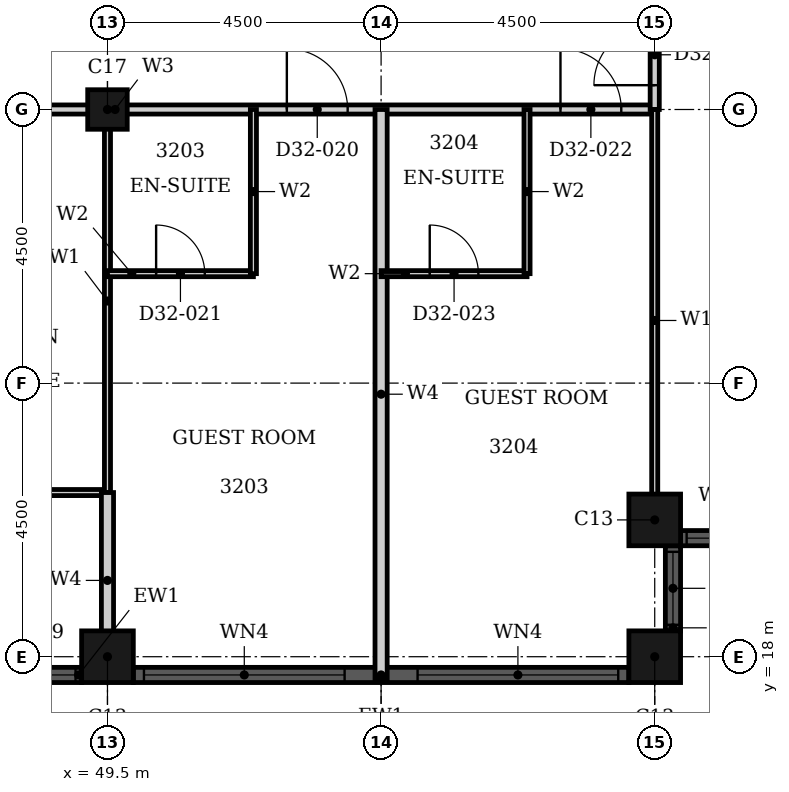
"""IFC4 building model, lengths in metres.
Left out: names, types, materials, properties, quantities, classifications, styles, units other than length and angle.
Written with IfcOpenShell. Run it as: python <this file> out.ifc"""

import sys

from ifc_helpers import new_model, si_unit, direction, frame, frame_2d, origin, origin_2d, place, context, subcontext, project, spatial, rectangle, hollow_rectangle, extrude, element, fill, save


model = new_model("IFC4")
c1 = context("Model", 3, precision=1e-05, world=origin(), true_north=direction((0.0, 1.0)))
c2 = subcontext(c1, "Body", "Model", "MODEL_VIEW")
j1 = project(units=[si_unit("LENGTHUNIT", "METRE"), si_unit("PLANEANGLEUNIT", "RADIAN")], contexts=[c1])
p1 = place(None, origin())
s1 = spatial("IfcSite", under=j1, at=p1, CompositionType="ELEMENT")
p2 = place(p1, origin())
s2 = spatial("IfcBuilding", under=s1, at=p2, CompositionType="ELEMENT")
p3 = place(p2, frame((0.0, 0.0, 129.6)))
s3 = spatial("IfcBuildingStorey", under=s2, at=p3, CompositionType="ELEMENT", Elevation=129.6)
for number, where, z_axis, x_axis in (
    (1, (49.5, 18.0, 0.0), (0.0, 0.0, 1.0), (1.0, 0.0, 0.0)),
    (2, (58.5, 18.0, 0.0), (0.0, 0.0, 1.0), (1.0, 0.0, 0.0)),
    (3, (58.5, 20.25, 0.0), (0.0, 0.0, 1.0), (1.0, 0.0, 0.0)),
):
    element("IfcColumn", number, at=place(p3, frame(where, z_axis=z_axis, x_axis=x_axis)), inside=s3, PredefinedType="COLUMN", context=c2, shape_type="SweptSolid", body=[
        extrude(hollow_rectangle(XDim=0.85, YDim=0.85, WallThickness=0.026, at=origin_2d()), origin(), (0.0, 0.0, 1.0), 3.6),
    ])
p4 = place(p3, frame((49.5, 27.0, 0.0), z_axis=(0.0, 0.0, 1.0), x_axis=(1.0, 0.0, 0.0)))
e4 = element("IfcColumn", 4, at=p4, inside=s3, PredefinedType="COLUMN", context=c2, shape_type="SweptSolid", body=[
    extrude(hollow_rectangle(XDim=0.65, YDim=0.65, WallThickness=0.021, at=origin_2d()), origin(), (0.0, 0.0, 1.0), 3.6),
])
p5 = place(p3, frame((47.675, 17.7, 0.0), z_axis=(0.0, 0.0, 1.0), x_axis=(1.0, 0.0, 0.0)))
e5 = element("IfcWall", 5, at=p5, inside=s3, PredefinedType="SOLIDWALL", context=c2, shape_type="SweptSolid", body=[
    extrude(rectangle(XDim=1.4, YDim=0.25, at=frame_2d((0.7, 0.0))), origin(), (0.0, 0.0, 1.0), 3.6),
])
p6 = place(p5, frame((0.1, 0.0, 0.9)))
e6 = element("IfcOpeningElement", 6, at=p6, cuts=e5, PredefinedType="OPENING", context=c2, shape_type="SweptSolid", body=[
    extrude(rectangle(XDim=1.2, YDim=2.08, at=frame_2d((0.6, 1.04))), frame((0.0, 0.135, 0.0), z_axis=(0.0, -1.0, 0.0), x_axis=(1.0, 0.0, 0.0)), (0.0, 0.0, 1.0), 0.27),
])
p7 = place(p3, frame((49.925, 17.7, 0.0), z_axis=(0.0, 0.0, 1.0), x_axis=(1.0, 0.0, 0.0)))
e7 = element("IfcWall", 7, at=p7, inside=s3, PredefinedType="SOLIDWALL", context=c2, shape_type="SweptSolid", body=[
    extrude(rectangle(XDim=8.15, YDim=0.25, at=frame_2d((4.075, 0.0))), origin(), (0.0, 0.0, 1.0), 3.6),
])
p8 = place(p7, frame((0.175, 0.0, 0.9)))
e8 = element("IfcOpeningElement", 8, at=p8, cuts=e7, PredefinedType="OPENING", context=c2, shape_type="SweptSolid", body=[
    extrude(rectangle(XDim=3.3, YDim=2.08, at=frame_2d((1.65, 1.04))), frame((0.0, 0.135, 0.0), z_axis=(0.0, -1.0, 0.0), x_axis=(1.0, 0.0, 0.0)), (0.0, 0.0, 1.0), 0.27),
])
p9 = place(p7, frame((4.675, 0.0, 0.9)))
e9 = element("IfcOpeningElement", 9, at=p9, cuts=e7, PredefinedType="OPENING", context=c2, shape_type="SweptSolid", body=[
    extrude(rectangle(XDim=3.3, YDim=2.08, at=frame_2d((1.65, 1.04))), frame((0.0, 0.135, 0.0), z_axis=(0.0, -1.0, 0.0), x_axis=(1.0, 0.0, 0.0)), (0.0, 0.0, 1.0), 0.27),
])
p10 = place(p3, frame((58.8, 18.425, 0.0), z_axis=(0.0, 0.0, 1.0), x_axis=(0.0, 1.0, 0.0)))
e10 = element("IfcWall", 10, at=p10, inside=s3, PredefinedType="SOLIDWALL", context=c2, shape_type="SweptSolid", body=[
    extrude(rectangle(XDim=1.4, YDim=0.25, at=frame_2d((0.7, 0.0))), origin(), (0.0, 0.0, 1.0), 3.6),
])
p11 = place(p10, frame((0.1, 0.0, 0.9)))
e11 = element("IfcOpeningElement", 11, at=p11, cuts=e10, PredefinedType="OPENING", context=c2, shape_type="SweptSolid", body=[
    extrude(rectangle(XDim=1.2, YDim=2.08, at=frame_2d((0.6, 1.04))), frame((0.0, 0.135, 0.0), z_axis=(0.0, -1.0, 0.0), x_axis=(1.0, 0.0, 0.0)), (0.0, 0.0, 1.0), 0.27),
])
p12 = place(p3, frame((58.925, 19.95, 0.0), z_axis=(0.0, 0.0, 1.0), x_axis=(1.0, 0.0, 0.0)))
e12 = element("IfcWall", 12, at=p12, inside=s3, PredefinedType="SOLIDWALL", context=c2, shape_type="SweptSolid", body=[
    extrude(rectangle(XDim=1.4, YDim=0.25, at=frame_2d((0.7, 0.0))), origin(), (0.0, 0.0, 1.0), 3.6),
])
p13 = place(p12, frame((0.1, 0.0, 0.9)))
e13 = element("IfcOpeningElement", 13, at=p13, cuts=e12, PredefinedType="OPENING", context=c2, shape_type="SweptSolid", body=[
    extrude(rectangle(XDim=1.2, YDim=2.08, at=frame_2d((0.6, 1.04))), frame((0.0, 0.135, 0.0), z_axis=(0.0, -1.0, 0.0), x_axis=(1.0, 0.0, 0.0)), (0.0, 0.0, 1.0), 0.27),
])
p14 = place(p3, frame((46.8, 27.0, 0.0), z_axis=(0.0, 0.0, 1.0), x_axis=(1.0, 0.0, 0.0)))
e14 = element("IfcWall", 14, at=p14, inside=s3, PredefinedType="PARTITIONING", context=c2, shape_type="SweptSolid", body=[
    extrude(rectangle(XDim=11.7, YDim=0.15, at=frame_2d((5.85, 0.0))), origin(), (0.0, 0.0, 1.0), 2.58),
])
p15 = place(p14, frame((5.65, 0.0, 0.0)))
e15 = element("IfcOpeningElement", 15, at=p15, cuts=e14, PredefinedType="OPENING", context=c2, shape_type="SweptSolid", body=[
    extrude(rectangle(XDim=1.0, YDim=2.1, at=frame_2d((0.5, 1.05))), frame((0.0, 0.085, 0.0), z_axis=(0.0, -1.0, 0.0), x_axis=(1.0, 0.0, 0.0)), (0.0, 0.0, 1.0), 0.17),
])
p16 = place(p14, frame((10.15, 0.0, 0.0)))
e16 = element("IfcOpeningElement", 16, at=p16, cuts=e14, PredefinedType="OPENING", context=c2, shape_type="SweptSolid", body=[
    extrude(rectangle(XDim=1.0, YDim=2.1, at=frame_2d((0.5, 1.05))), frame((0.0, 0.085, 0.0), z_axis=(0.0, -1.0, 0.0), x_axis=(1.0, 0.0, 0.0)), (0.0, 0.0, 1.0), 0.17),
])
p17 = place(p3, frame((58.5, 27.0, 0.0), z_axis=(0.0, 0.0, 1.0), x_axis=(0.0, 1.0, 0.0)))
e17 = element("IfcWall", 17, at=p17, inside=s3, PredefinedType="PARTITIONING", context=c2, shape_type="SweptSolid", body=[
    extrude(rectangle(XDim=1.8, YDim=0.15, at=frame_2d((0.9, 0.0))), origin(), (0.0, 0.0, 1.0), 3.3),
])
p18 = place(p17, frame((0.4, 0.0, 0.0)))
e18 = element("IfcOpeningElement", 18, at=p18, cuts=e17, PredefinedType="OPENING", context=c2, shape_type="SweptSolid", body=[
    extrude(rectangle(XDim=1.0, YDim=2.1, at=frame_2d((0.5, 1.05))), frame((0.0, 0.085, 0.0), z_axis=(0.0, -1.0, 0.0), x_axis=(1.0, 0.0, 0.0)), (0.0, 0.0, 1.0), 0.17),
])
p19 = place(p3, frame((46.8, 20.7, 0.0), z_axis=(0.0, 0.0, 1.0), x_axis=(1.0, 0.0, 0.0)))
e19 = element("IfcWall", 19, at=p19, inside=s3, PredefinedType="PARTITIONING", context=c2, shape_type="SweptSolid", body=[
    extrude(rectangle(XDim=2.7, YDim=0.1, at=frame_2d((1.35, 0.0))), origin(), (0.0, 0.0, 1.0), 3.3),
])
p20 = place(p3, frame((49.5, 20.7, 0.0), z_axis=(0.0, 0.0, 1.0), x_axis=(0.0, 1.0, 0.0)))
e20 = element("IfcWall", 20, at=p20, inside=s3, PredefinedType="PARTITIONING", context=c2, shape_type="SweptSolid", body=[
    extrude(rectangle(XDim=6.3, YDim=0.1, at=frame_2d((3.15, 0.0))), origin(), (0.0, 0.0, 1.0), 2.38),
])
p21 = place(p3, frame((58.5, 20.06, 0.0), z_axis=(0.0, 0.0, 1.0), x_axis=(0.0, 1.0, 0.0)))
e21 = element("IfcWall", 21, at=p21, inside=s3, PredefinedType="PARTITIONING", context=c2, shape_type="SweptSolid", body=[
    extrude(rectangle(XDim=6.94, YDim=0.1, at=frame_2d((3.47, 0.0))), origin(), (0.0, 0.0, 1.0), 3.3),
])
p22 = place(p3, frame((49.5, 17.81, 0.0), z_axis=(0.0, 0.0, 1.0), x_axis=(0.0, 1.0, 0.0)))
e22 = element("IfcWall", 22, at=p22, inside=s3, PredefinedType="PARTITIONING", context=c2, shape_type="SweptSolid", body=[
    extrude(rectangle(XDim=2.89, YDim=0.2, at=frame_2d((1.445, 0.0))), origin(), (0.0, 0.0, 1.0), 2.38),
])
p23 = place(p3, frame((54.0, 17.635, 0.0), z_axis=(0.0, 0.0, 1.0), x_axis=(0.0, 1.0, 0.0)))
e23 = element("IfcWall", 23, at=p23, inside=s3, PredefinedType="PARTITIONING", context=c2, shape_type="SweptSolid", body=[
    extrude(rectangle(XDim=9.365, YDim=0.2, at=frame_2d((4.683, 0.0))), origin(), (0.0, 0.0, 1.0), 3.3),
])
p24 = place(p3, frame((49.5, 24.3, 0.0), z_axis=(0.0, 0.0, 1.0), x_axis=(1.0, 0.0, 0.0)))
e24 = element("IfcWall", 24, at=p24, inside=s3, PredefinedType="PARTITIONING", context=c2, shape_type="SweptSolid", body=[
    extrude(rectangle(XDim=2.4, YDim=0.1, at=frame_2d((1.2, 0.0))), origin(), (0.0, 0.0, 1.0), 3.3),
])
p25 = place(p24, frame((0.8, 0.0, 0.0)))
e25 = element("IfcOpeningElement", 25, at=p25, cuts=e24, PredefinedType="OPENING", context=c2, shape_type="SweptSolid", body=[
    extrude(rectangle(XDim=0.8, YDim=2.1, at=frame_2d((0.4, 1.05))), frame((0.0, 0.06, 0.0), z_axis=(0.0, -1.0, 0.0), x_axis=(1.0, 0.0, 0.0)), (0.0, 0.0, 1.0), 0.12),
])
p26 = place(p3, frame((54.0, 24.3, 0.0), z_axis=(0.0, 0.0, 1.0), x_axis=(1.0, 0.0, 0.0)))
e26 = element("IfcWall", 26, at=p26, inside=s3, PredefinedType="PARTITIONING", context=c2, shape_type="SweptSolid", body=[
    extrude(rectangle(XDim=2.4, YDim=0.1, at=frame_2d((1.2, 0.0))), origin(), (0.0, 0.0, 1.0), 3.3),
])
p27 = place(p26, frame((0.8, 0.0, 0.0)))
e27 = element("IfcOpeningElement", 27, at=p27, cuts=e26, PredefinedType="OPENING", context=c2, shape_type="SweptSolid", body=[
    extrude(rectangle(XDim=0.8, YDim=2.1, at=frame_2d((0.4, 1.05))), frame((0.0, 0.06, 0.0), z_axis=(0.0, -1.0, 0.0), x_axis=(1.0, 0.0, 0.0)), (0.0, 0.0, 1.0), 0.12),
])
for number, where, z_axis, x_axis in (
    (28, (51.9, 24.3, 0.0), (0.0, 0.0, 1.0), (0.0, 1.0, 0.0)),
    (29, (56.4, 24.3, 0.0), (0.0, 0.0, 1.0), (0.0, 1.0, 0.0)),
):
    element("IfcWall", number, at=place(p3, frame(where, z_axis=z_axis, x_axis=x_axis)), inside=s3, PredefinedType="PARTITIONING", context=c2, shape_type="SweptSolid", body=[
        extrude(rectangle(XDim=2.7, YDim=0.1, at=frame_2d((1.35, 0.0))), origin(), (0.0, 0.0, 1.0), 3.3),
    ])
p28 = place(p6, origin())
e30 = element("IfcWindow", 30, at=p28, inside=s3, PartitioningType="SINGLE_PANEL", PredefinedType="WINDOW", context=c2, shape_type="SweptSolid", body=[
    extrude(rectangle(XDim=1.2, YDim=2.08, at=frame_2d((0.6, 1.04))), frame((0.0, 0.03, 0.0), z_axis=(0.0, -1.0, 0.0), x_axis=(1.0, 0.0, 0.0)), (0.0, 0.0, 1.0), 0.06),
])
fill(e6, e30)
p29 = place(p8, origin())
e31 = element("IfcWindow", 31, at=p29, inside=s3, PartitioningType="SINGLE_PANEL", PredefinedType="WINDOW", context=c2, shape_type="SweptSolid", body=[
    extrude(rectangle(XDim=3.3, YDim=2.08, at=frame_2d((1.65, 1.04))), frame((0.0, 0.03, 0.0), z_axis=(0.0, -1.0, 0.0), x_axis=(1.0, 0.0, 0.0)), (0.0, 0.0, 1.0), 0.06),
])
fill(e8, e31)
p30 = place(p9, origin())
e32 = element("IfcWindow", 32, at=p30, inside=s3, PartitioningType="SINGLE_PANEL", PredefinedType="WINDOW", context=c2, shape_type="SweptSolid", body=[
    extrude(rectangle(XDim=3.3, YDim=2.08, at=frame_2d((1.65, 1.04))), frame((0.0, 0.03, 0.0), z_axis=(0.0, -1.0, 0.0), x_axis=(1.0, 0.0, 0.0)), (0.0, 0.0, 1.0), 0.06),
])
fill(e9, e32)
p31 = place(p11, origin())
e33 = element("IfcWindow", 33, at=p31, inside=s3, PartitioningType="SINGLE_PANEL", PredefinedType="WINDOW", context=c2, shape_type="SweptSolid", body=[
    extrude(rectangle(XDim=1.2, YDim=2.08, at=frame_2d((0.6, 1.04))), frame((0.0, 0.03, 0.0), z_axis=(0.0, -1.0, 0.0), x_axis=(1.0, 0.0, 0.0)), (0.0, 0.0, 1.0), 0.06),
])
fill(e11, e33)
p32 = place(p13, origin())
e34 = element("IfcWindow", 34, at=p32, inside=s3, PartitioningType="SINGLE_PANEL", PredefinedType="WINDOW", context=c2, shape_type="SweptSolid", body=[
    extrude(rectangle(XDim=1.2, YDim=2.08, at=frame_2d((0.6, 1.04))), frame((0.0, 0.03, 0.0), z_axis=(0.0, -1.0, 0.0), x_axis=(1.0, 0.0, 0.0)), (0.0, 0.0, 1.0), 0.06),
])
fill(e13, e34)
p33 = place(p15, origin())
e35 = element("IfcDoor", 35, at=p33, inside=s3, OperationType="SINGLE_SWING_RIGHT", PredefinedType="DOOR", context=c2, shape_type="SweptSolid", body=[
    extrude(rectangle(XDim=1.0, YDim=2.1, at=frame_2d((0.5, 1.05))), frame((0.0, 0.025, 0.0), z_axis=(0.0, -1.0, 0.0), x_axis=(1.0, 0.0, 0.0)), (0.0, 0.0, 1.0), 0.05),
])
fill(e15, e35)
p34 = place(p25, origin())
e36 = element("IfcDoor", 36, at=p34, inside=s3, OperationType="SINGLE_SWING_LEFT", PredefinedType="DOOR", context=c2, shape_type="SweptSolid", body=[
    extrude(rectangle(XDim=0.8, YDim=2.1, at=frame_2d((0.4, 1.05))), frame((0.0, 0.025, 0.0), z_axis=(0.0, -1.0, 0.0), x_axis=(1.0, 0.0, 0.0)), (0.0, 0.0, 1.0), 0.05),
])
fill(e25, e36)
p35 = place(p16, origin())
e37 = element("IfcDoor", 37, at=p35, inside=s3, OperationType="SINGLE_SWING_RIGHT", PredefinedType="DOOR", context=c2, shape_type="SweptSolid", body=[
    extrude(rectangle(XDim=1.0, YDim=2.1, at=frame_2d((0.5, 1.05))), frame((0.0, 0.025, 0.0), z_axis=(0.0, -1.0, 0.0), x_axis=(1.0, 0.0, 0.0)), (0.0, 0.0, 1.0), 0.05),
])
fill(e16, e37)
p36 = place(p27, origin())
e38 = element("IfcDoor", 38, at=p36, inside=s3, OperationType="SINGLE_SWING_RIGHT", PredefinedType="DOOR", context=c2, shape_type="SweptSolid", body=[
    extrude(rectangle(XDim=0.8, YDim=2.1, at=frame_2d((0.4, 1.05))), frame((0.0, 0.025, 0.0), z_axis=(0.0, -1.0, 0.0), x_axis=(1.0, 0.0, 0.0)), (0.0, 0.0, 1.0), 0.05),
])
fill(e27, e38)
p37 = place(p18, origin())
e39 = element("IfcDoor", 39, at=p37, inside=s3, OperationType="SINGLE_SWING_LEFT", PredefinedType="DOOR", context=c2, shape_type="SweptSolid", body=[
    extrude(rectangle(XDim=1.0, YDim=2.1, at=frame_2d((0.5, 1.05))), frame((0.0, 0.025, 0.0), z_axis=(0.0, -1.0, 0.0), x_axis=(1.0, 0.0, 0.0)), (0.0, 0.0, 1.0), 0.05),
])
fill(e18, e39)
save(model, sys.argv[1])
